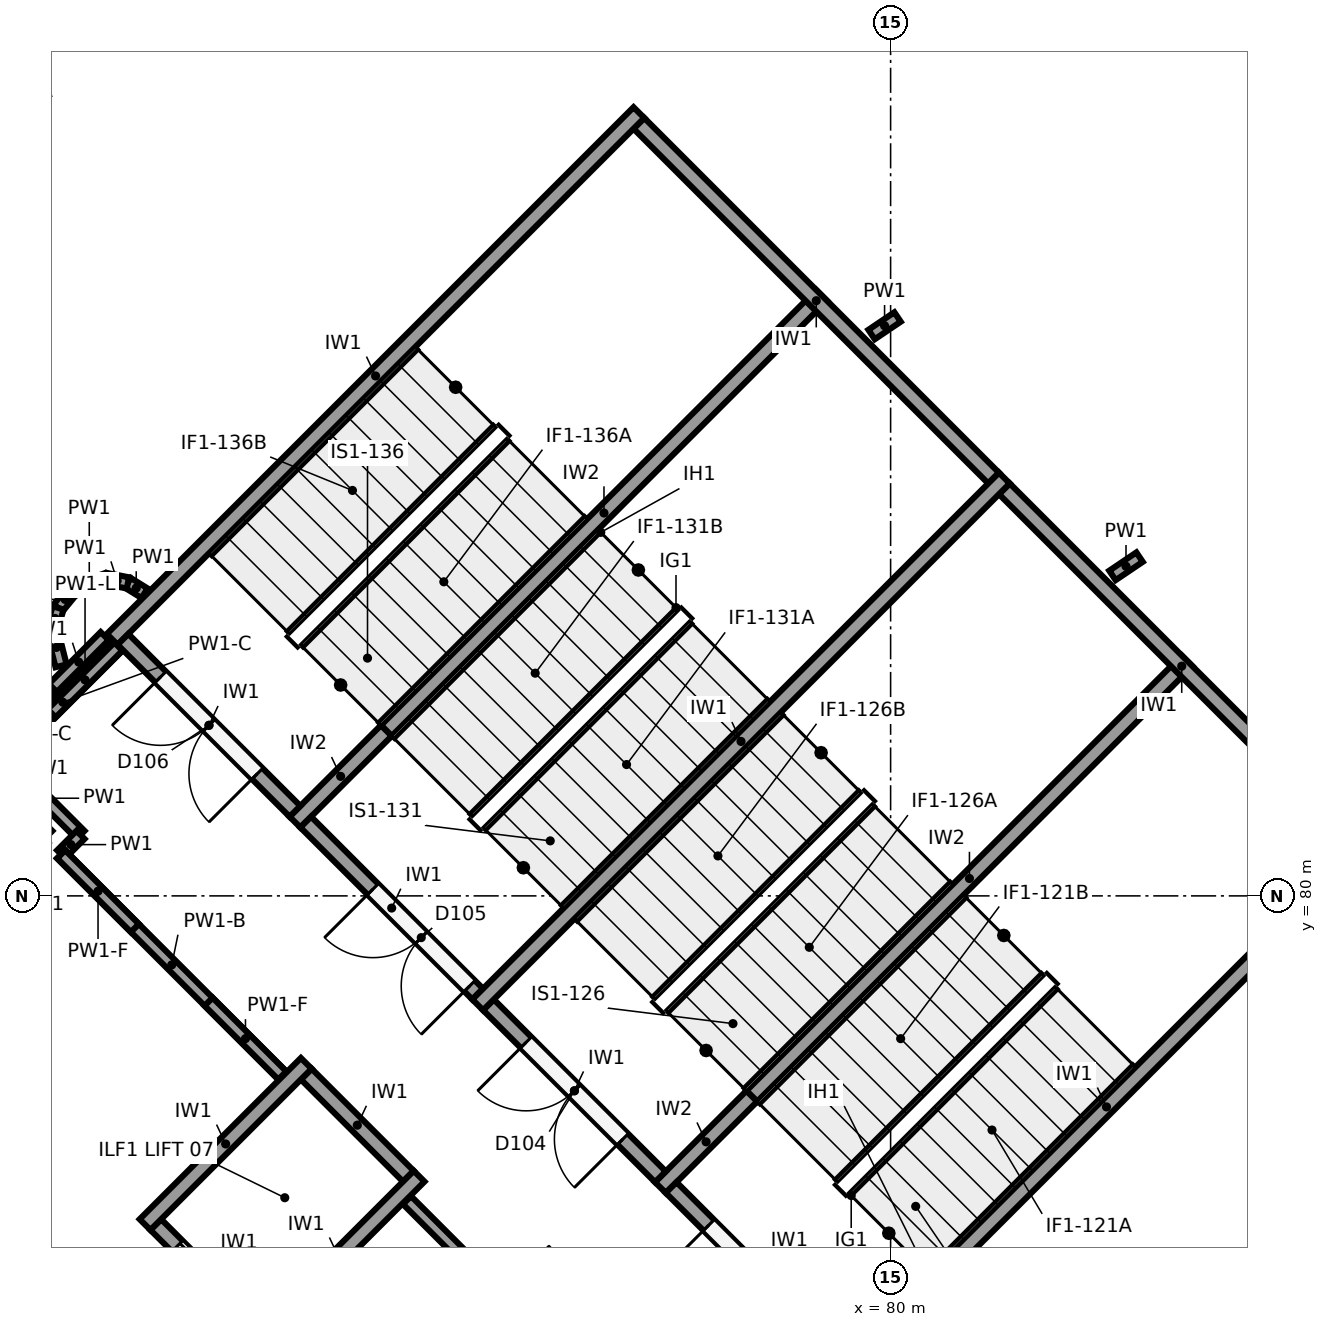
"""IFC4 building model, lengths in metres.
Left out: names, types, materials, properties, quantities, classifications, styles, units other than length and angle.
Written with IfcOpenShell. Run it as: python <this file> out.ifc"""

import sys

from ifc_helpers import new_model, si_unit, direction, frame, frame_2d, origin, origin_2d, place, context, subcontext, project, spatial, rectangle, circle, extrude, element, fill, save


model = new_model("IFC4")
c1 = context("Model", 3, precision=1e-05, world=origin(), true_north=direction((0.0, 1.0)))
c2 = subcontext(c1, "Body", "Model", "MODEL_VIEW")
j1 = project(units=[si_unit("LENGTHUNIT", "METRE"), si_unit("PLANEANGLEUNIT", "RADIAN")], contexts=[c1])
p1 = place(None, origin())
s1 = spatial("IfcSite", under=j1, at=p1, CompositionType="ELEMENT")
p2 = place(p1, origin())
s2 = spatial("IfcBuilding", under=s1, at=p2, CompositionType="ELEMENT")
p3 = place(p2, frame((0.0, 0.0, -4.0)))
s3 = spatial("IfcBuildingStorey", under=s2, at=p3, CompositionType="ELEMENT", Elevation=-4.0)
p4 = place(p3, frame((71.775, 79.889, -1.2), z_axis=(0.0, 0.0, 1.0), x_axis=(1.0, 0.0, 0.0)))
e1 = element("IfcColumn", 1, at=p4, inside=s3, PredefinedType="COLUMN", context=c2, shape_type="SweptSolid", body=[
    extrude(circle(Radius=0.6, at=origin_2d()), origin(), (0.0, 0.0, 1.0), 5.2),
])
p5 = place(p3, frame((85.174, 89.174, -0.4), z_axis=(0.0, 0.0, 1.0), x_axis=(1.0, 0.0, 0.0)))
e2 = element("IfcColumn", 2, at=p5, inside=s3, PredefinedType="COLUMN", context=c2, shape_type="SweptSolid", body=[
    extrude(circle(Radius=0.5, at=origin_2d()), origin(), (0.0, 0.0, 1.0), 4.4),
])
p6 = place(p3, frame((71.857, 91.151, -0.4), z_axis=(0.0, 0.0, 1.0), x_axis=(1.0, 0.0, 0.0)))
e3 = element("IfcColumn", 3, at=p6, inside=s3, PredefinedType="COLUMN", context=c2, shape_type="SweptSolid", body=[
    extrude(circle(Radius=0.45, at=origin_2d()), origin(), (0.0, 0.0, 1.0), 4.4),
])
for number, where, z_axis, x_axis in (
    (4, (86.305, 80.688, -1.2), (0.0, 0.0, 1.0), (-0.707, -0.707, 0.0)),
    (5, (81.497, 85.497, -1.2), (0.0, 0.0, 1.0), (-0.707, -0.707, 0.0)),
    (6, (76.688, 90.305, -1.2), (0.0, 0.0, 1.0), (-0.707, -0.707, 0.0)),
):
    element("IfcWall", number, at=place(p3, frame(where, z_axis=z_axis, x_axis=x_axis)), inside=s3, PredefinedType="SHEAR", context=c2, shape_type="SweptSolid", body=[
        extrude(rectangle(XDim=9.8, YDim=0.2, at=frame_2d((4.9, 0.0))), origin(), (0.0, 0.0, 1.0), 4.8),
    ])
for number, where, z_axis, x_axis in (
    (7, (86.164, 80.688, -1.2), (0.0, 0.0, 1.0), (-0.707, 0.707, 0.0)),
    (8, (81.355, 85.497, -1.2), (0.0, 0.0, 1.0), (-0.707, 0.707, 0.0)),
):
    element("IfcWall", number, at=place(p3, frame(where, z_axis=z_axis, x_axis=x_axis)), inside=s3, PredefinedType="SHEAR", context=c2, shape_type="SweptSolid", body=[
        extrude(rectangle(XDim=6.6, YDim=0.2, at=frame_2d((3.3, 0.0))), origin(), (0.0, 0.0, 1.0), 4.8),
    ])
p7 = place(p3, frame((83.901, 83.093, -1.2), z_axis=(0.0, 0.0, 1.0), x_axis=(-0.707106781187, -0.707106781187, 0.0)))
e9 = element("IfcWall", 9, at=p7, inside=s3, PredefinedType="SHEAR", context=c2, shape_type="SweptSolid", body=[
    extrude(rectangle(XDim=8.1, YDim=0.2, at=frame_2d((4.05, 0.0))), origin(), (0.0, 0.0, 1.0), 4.8),
])
p8 = place(p3, frame((78.173, 77.365, -1.2), z_axis=(0.0, 0.0, 1.0), x_axis=(-0.707178586901, -0.707034968179, 0.0)))
e10 = element("IfcWall", 10, at=p8, inside=s3, PredefinedType="SHEAR", context=c2, shape_type="SweptSolid", body=[
    extrude(rectangle(XDim=1.7, YDim=0.2, at=frame_2d((0.85, 0.0))), origin(), (0.0, 0.0, 1.0), 4.8),
])
p9 = place(p3, frame((79.093, 87.901, -1.2), z_axis=(0.0, 0.0, 1.0), x_axis=(-0.707106781187, -0.707106781187, 0.0)))
e11 = element("IfcWall", 11, at=p9, inside=s3, PredefinedType="SHEAR", context=c2, shape_type="SweptSolid", body=[
    extrude(rectangle(XDim=8.1, YDim=0.2, at=frame_2d((4.05, 0.0))), origin(), (0.0, 0.0, 1.0), 4.8),
])
p10 = place(p3, frame((73.365, 82.173, -1.2), z_axis=(0.0, 0.0, 1.0), x_axis=(-0.707034968179, -0.707178586901, 0.0)))
e12 = element("IfcWall", 12, at=p10, inside=s3, PredefinedType="SHEAR", context=c2, shape_type="SweptSolid", body=[
    extrude(rectangle(XDim=1.7, YDim=0.2, at=frame_2d((0.85, 0.0))), origin(), (0.0, 0.0, 1.0), 4.8),
])
p11 = place(p3, frame((79.375, 73.9, -1.2), z_axis=(0.0, 0.0, 1.0), x_axis=(-0.707068634461, 0.707144925854, 0.0)))
e13 = element("IfcWall", 13, at=p11, inside=s3, PredefinedType="SHEAR", context=c2, shape_type="SweptSolid", body=[
    extrude(rectangle(XDim=3.2, YDim=0.2, at=frame_2d((1.6, 0.0))), origin(), (0.0, 0.0, 1.0), 4.8),
])
p12 = place(p11, frame((0.7, 0.0, 1.2)))
e14 = element("IfcOpeningElement", 14, at=p12, cuts=e13, PredefinedType="OPENING", context=c2, shape_type="SweptSolid", body=[
    extrude(rectangle(XDim=1.8, YDim=2.1, at=frame_2d((0.9, 1.05))), frame((0.0, 0.11, 0.0), z_axis=(0.0, -1.0, 0.0), x_axis=(1.0, 0.0, 0.0)), (0.0, 0.0, 1.0), 0.22),
])
p13 = place(p3, frame((76.971, 76.304, -1.2), z_axis=(0.0, 0.0, 1.0), x_axis=(-0.707106781187, 0.707106781187, 0.0)))
e15 = element("IfcWall", 15, at=p13, inside=s3, PredefinedType="SHEAR", context=c2, shape_type="SweptSolid", body=[
    extrude(rectangle(XDim=3.2, YDim=0.2, at=frame_2d((1.6, 0.0))), origin(), (0.0, 0.0, 1.0), 4.8),
])
p14 = place(p13, frame((0.7, 0.0, 1.2)))
e16 = element("IfcOpeningElement", 16, at=p14, cuts=e15, PredefinedType="OPENING", context=c2, shape_type="SweptSolid", body=[
    extrude(rectangle(XDim=1.8, YDim=2.1, at=frame_2d((0.9, 1.05))), frame((0.0, 0.11, 0.0), z_axis=(0.0, -1.0, 0.0), x_axis=(1.0, 0.0, 0.0)), (0.0, 0.0, 1.0), 0.22),
])
p15 = place(p3, frame((74.567, 78.708, -1.2), z_axis=(0.0, 0.0, 1.0), x_axis=(-0.707106781187, 0.707106781187, 0.0)))
e17 = element("IfcWall", 17, at=p15, inside=s3, PredefinedType="SHEAR", context=c2, shape_type="SweptSolid", body=[
    extrude(rectangle(XDim=3.2, YDim=0.2, at=frame_2d((1.6, 0.0))), origin(), (0.0, 0.0, 1.0), 4.8),
])
p16 = place(p15, frame((0.15, 0.0, 1.2)))
e18 = element("IfcOpeningElement", 18, at=p16, cuts=e17, PredefinedType="OPENING", context=c2, shape_type="SweptSolid", body=[
    extrude(rectangle(XDim=1.8, YDim=2.1, at=frame_2d((0.9, 1.05))), frame((0.0, 0.11, 0.0), z_axis=(0.0, -1.0, 0.0), x_axis=(1.0, 0.0, 0.0)), (0.0, 0.0, 1.0), 0.22),
])
p17 = place(p3, frame((72.163, 81.113, -1.2), z_axis=(0.0, 0.0, 1.0), x_axis=(-0.707144925854, 0.707068634461, 0.0)))
e19 = element("IfcWall", 19, at=p17, inside=s3, PredefinedType="SHEAR", context=c2, shape_type="SweptSolid", body=[
    extrude(rectangle(XDim=3.2, YDim=0.2, at=frame_2d((1.6, 0.0))), origin(), (0.0, 0.0, 1.0), 4.8),
])
p18 = place(p17, frame((0.7, 0.0, 1.2)))
e20 = element("IfcOpeningElement", 20, at=p18, cuts=e19, PredefinedType="OPENING", context=c2, shape_type="SweptSolid", body=[
    extrude(rectangle(XDim=1.8, YDim=2.1, at=frame_2d((0.9, 1.05))), frame((0.0, 0.11, 0.0), z_axis=(0.0, -1.0, 0.0), x_axis=(1.0, 0.0, 0.0)), (0.0, 0.0, 1.0), 0.22),
])
for number, where, z_axis, x_axis in (
    (21, (73.797, 76.312, -1.2), (0.0, 0.0, 1.0), (-0.707, -0.707, 0.0)),
    (22, (72.312, 77.797, -1.2), (0.0, 0.0, 1.0), (-0.707, -0.707, 0.0)),
):
    element("IfcWall", number, at=place(p3, frame(where, z_axis=z_axis, x_axis=x_axis)), inside=s3, PredefinedType="SHEAR", context=c2, shape_type="SweptSolid", body=[
        extrude(rectangle(XDim=3.0, YDim=0.2, at=frame_2d((1.5, 0.0))), origin(), (0.0, 0.0, 1.0), 4.8),
    ])
p19 = place(p3, frame((73.656, 76.312, -1.2), z_axis=(0.0, 0.0, 1.0), x_axis=(-0.707106781187, 0.707106781187, 0.0)))
e23 = element("IfcWall", 23, at=p19, inside=s3, PredefinedType="SHEAR", context=c2, shape_type="SweptSolid", body=[
    extrude(rectangle(XDim=1.9, YDim=0.2, at=frame_2d((0.95, 0.0))), origin(), (0.0, 0.0, 1.0), 4.8),
])
p20 = place(p3, frame((71.676, 74.332, -1.2), z_axis=(0.0, 0.0, 1.0), x_axis=(-0.707106781187, 0.707106781187, 0.0)))
e24 = element("IfcWall", 24, at=p20, inside=s3, PredefinedType="SHEAR", context=c2, shape_type="SweptSolid", body=[
    extrude(rectangle(XDim=1.9, YDim=0.2, at=frame_2d((0.95, 0.0))), origin(), (0.0, 0.0, 1.0), 4.8),
])
p21 = place(p20, frame((0.4, 0.0, 1.2)))
e25 = element("IfcOpeningElement", 25, at=p21, cuts=e24, PredefinedType="OPENING", context=c2, shape_type="SweptSolid", body=[
    extrude(rectangle(XDim=1.1, YDim=2.1, at=frame_2d((0.55, 1.05))), frame((0.0, 0.11, 0.0), z_axis=(0.0, -1.0, 0.0), x_axis=(1.0, 0.0, 0.0)), (0.0, 0.0, 1.0), 0.22),
])
p22 = place(p3, frame((68.998, 95.137, -1.2), z_axis=(0.0, 0.0, 1.0), x_axis=(-0.330263153216, -0.943888896866, 0.0)))
e26 = element("IfcWall", 26, at=p22, inside=s3, PredefinedType="SHEAR", context=c2, shape_type="SweptSolid", body=[
    extrude(rectangle(XDim=8.1, YDim=0.2, at=frame_2d((4.05, 0.0))), origin(), (0.0, 0.0, 1.0), 4.8),
])
p23 = place(p3, frame((82.919, 84.216, 0.0), z_axis=(0.0, 0.0, 1.0), x_axis=(0.828717044538, 0.55966781227, 0.0)))
e27 = element("IfcWall", 27, at=p23, inside=s3, PredefinedType="PARTITIONING", context=c2, shape_type="SweptSolid", body=[
    extrude(rectangle(XDim=0.43, YDim=0.15, at=frame_2d((0.215, 0.0))), origin(), (0.0, 0.0, 1.0), 3.6),
])
p24 = place(p3, frame((69.66, 83.418, 0.0), z_axis=(0.0, 0.0, 1.0), x_axis=(-0.706980568466, -0.707232971383, 0.0)))
e28 = element("IfcWall", 28, at=p24, inside=s3, PredefinedType="PARTITIONING", context=c2, shape_type="SweptSolid", body=[
    extrude(rectangle(XDim=0.967, YDim=0.15, at=frame_2d((0.484, 0.0))), origin(), (0.0, 0.0, 1.0), 3.6),
])
p25 = place(p3, frame((68.976, 82.734, 0.0), z_axis=(0.0, 0.0, 1.0), x_axis=(-0.707359184083, -0.706854288163, 0.0)))
e29 = element("IfcWall", 29, at=p25, inside=s3, PredefinedType="PARTITIONING", context=c2, shape_type="SweptSolid", body=[
    extrude(rectangle(XDim=0.484, YDim=0.15, at=frame_2d((0.242, 0.0))), origin(), (0.0, 0.0, 1.0), 2.7),
])
p26 = place(p3, frame((80.091, 87.616, 0.0), z_axis=(0.0, 0.0, 1.0), x_axis=(-0.828663224866, -0.559747496425, 0.0)))
e30 = element("IfcWall", 30, at=p26, inside=s3, PredefinedType="PARTITIONING", context=c2, shape_type="SweptSolid", body=[
    extrude(rectangle(XDim=0.412, YDim=0.15, at=frame_2d((0.206, 0.0))), origin(), (0.0, 0.0, 1.0), 3.6),
])
p27 = place(p3, frame((68.377, 81.767, 0.0), z_axis=(0.0, 0.0, 1.0), x_axis=(0.707106781187, -0.707106781187, 0.0)))
e31 = element("IfcWall", 31, at=p27, inside=s3, PredefinedType="PARTITIONING", context=c2, shape_type="SweptSolid", body=[
    extrude(rectangle(XDim=1.365, YDim=0.15, at=frame_2d((0.682, 0.0))), origin(), (0.0, 0.0, 1.0), 3.6),
])
p28 = place(p3, frame((69.342, 80.802, 0.0), z_axis=(0.0, 0.0, 1.0), x_axis=(-0.705750875464, -0.708460091877, 0.0)))
e32 = element("IfcWall", 32, at=p28, inside=s3, PredefinedType="PARTITIONING", context=c2, shape_type="SweptSolid", body=[
    extrude(rectangle(XDim=0.36, YDim=0.15, at=frame_2d((0.18, 0.0))), origin(), (0.0, 0.0, 1.0), 3.6),
])
p29 = place(p3, frame((69.087, 80.547, 0.0), z_axis=(0.0, 0.0, 1.0), x_axis=(0.707077113823, -0.707136447306, 0.0)))
e33 = element("IfcWall", 33, at=p29, inside=s3, PredefinedType="PARTITIONING", context=c2, shape_type="SweptSolid", body=[
    extrude(rectangle(XDim=4.115, YDim=0.15, at=frame_2d((2.057, 0.0))), origin(), (0.0, 0.0, 1.0), 2.5),
])
for number, where, z_axis, x_axis in (
    (34, (69.087, 80.547, 2.5), (0.0, 0.0, 1.0), (0.707, -0.707, 0.0)),
    (35, (71.027, 78.607, 2.5), (0.0, 0.0, 1.0), (0.707, -0.707, 0.0)),
):
    element("IfcWall", number, at=place(p3, frame(where, z_axis=z_axis, x_axis=x_axis)), inside=s3, PredefinedType="PARTITIONING", context=c2, shape_type="SweptSolid", body=[
        extrude(rectangle(XDim=1.372, YDim=0.15, at=frame_2d((0.686, 0.0))), origin(), (0.0, 0.0, 1.0), 1.1),
    ])
p30 = place(p3, frame((73.637, 75.997, 0.0), z_axis=(0.0, 0.0, 1.0), x_axis=(0.707128915972, -0.707084645708, 0.0)))
e36 = element("IfcWall", 36, at=p30, inside=s3, PredefinedType="PARTITIONING", context=c2, shape_type="SweptSolid", body=[
    extrude(rectangle(XDim=5.515, YDim=0.15, at=frame_2d((2.757, 0.0))), origin(), (0.0, 0.0, 1.0), 3.6),
])
p31 = place(p30, frame((1.75, 0.0, 0.0)))
e37 = element("IfcOpeningElement", 37, at=p31, cuts=e36, PredefinedType="OPENING", context=c2, shape_type="SweptSolid", body=[
    extrude(rectangle(XDim=1.8, YDim=2.1, at=frame_2d((0.9, 1.05))), frame((0.0, 0.085, 0.0), z_axis=(0.0, -1.0, 0.0), x_axis=(1.0, 0.0, 0.0)), (0.0, 0.0, 1.0), 0.17),
])
p32 = place(p3, frame((69.84, 83.28, 0.0), z_axis=(0.0, 0.0, 1.0), x_axis=(-0.707165768196, -0.707047789256, 0.0)))
e38 = element("IfcWall", 38, at=p32, inside=s3, PredefinedType="PARTITIONING", context=c2, shape_type="SweptSolid", body=[
    extrude(rectangle(XDim=2.069, YDim=0.15, at=frame_2d((1.035, 0.0))), origin(), (0.0, 0.0, 1.0), 2.7),
])
p33 = place(p3, frame((69.84, 83.28, 2.7), z_axis=(0.0, 0.0, 1.0), x_axis=(-0.707205106539, -0.70700844216, 0.0)))
e39 = element("IfcWall", 39, at=p33, inside=s3, PredefinedType="PARTITIONING", context=c2, shape_type="SweptSolid", body=[
    extrude(rectangle(XDim=1.241, YDim=0.15, at=frame_2d((0.621, 0.0))), origin(), (0.0, 0.0, 1.0), 0.9),
])
p34 = place(p3, frame((70.184, 83.982, 0.0), z_axis=(0.0, 0.0, 1.0), x_axis=(-0.850648487644, 0.525734867085, 0.0)))
e40 = element("IfcWall", 40, at=p34, inside=s3, PredefinedType="PARTITIONING", context=c2, shape_type="SweptSolid", body=[
    extrude(rectangle(XDim=0.258, YDim=0.15, at=frame_2d((0.129, 0.0))), origin(), (0.0, 0.0, 1.0), 3.6),
])
p35 = place(p3, frame((69.965, 84.118, 0.0), z_axis=(0.0, 0.0, 1.0), x_axis=(-0.9808082431, 0.194974845214, 0.0)))
e41 = element("IfcWall", 41, at=p35, inside=s3, PredefinedType="PARTITIONING", context=c2, shape_type="SweptSolid", body=[
    extrude(rectangle(XDim=0.288, YDim=0.15, at=frame_2d((0.144, 0.0))), origin(), (0.0, 0.0, 1.0), 3.6),
])
p36 = place(p3, frame((69.682, 84.174, 0.0), z_axis=(0.0, 0.0, 1.0), x_axis=(-0.941476660656, -0.337078177044, 0.0)))
e42 = element("IfcWall", 42, at=p36, inside=s3, PredefinedType="PARTITIONING", context=c2, shape_type="SweptSolid", body=[
    extrude(rectangle(XDim=0.479, YDim=0.15, at=frame_2d((0.24, 0.0))), origin(), (0.0, 0.0, 1.0), 3.6),
])
for number, where, z_axis, x_axis in (
    (43, (69.231, 84.012, 0.0), (0.0, 0.0, 1.0), (-0.635, -0.773, 0.0)),
    (44, (69.047, 83.789, 0.0), (0.0, 0.0, 1.0), (-0.29, -0.957, 0.0)),
):
    element("IfcWall", number, at=place(p3, frame(where, z_axis=z_axis, x_axis=x_axis)), inside=s3, PredefinedType="PARTITIONING", context=c2, shape_type="SweptSolid", body=[
        extrude(rectangle(XDim=0.289, YDim=0.15, at=frame_2d((0.145, 0.0))), origin(), (0.0, 0.0, 1.0), 3.6),
    ])
p37 = place(p3, frame((68.963, 83.512, 0.0), z_axis=(0.0, 0.0, 1.0), x_axis=(0.244371491545, -0.969681687009, 0.0)))
e45 = element("IfcWall", 45, at=p37, inside=s3, PredefinedType="PARTITIONING", context=c2, shape_type="SweptSolid", body=[
    extrude(rectangle(XDim=0.5, YDim=0.15, at=frame_2d((0.25, 0.0))), origin(), (0.0, 0.0, 1.0), 3.6),
])
p38 = place(p12, origin())
e46 = element("IfcDoor", 46, at=p38, inside=s3, OperationType="DOUBLE_DOOR_SINGLE_SWING", PredefinedType="DOOR", context=c2, shape_type="SweptSolid", body=[
    extrude(rectangle(XDim=1.8, YDim=2.1, at=frame_2d((0.9, 1.05))), frame((0.0, 0.025, 0.0), z_axis=(0.0, -1.0, 0.0), x_axis=(1.0, 0.0, 0.0)), (0.0, 0.0, 1.0), 0.05),
])
fill(e14, e46)
p39 = place(p14, origin())
e47 = element("IfcDoor", 47, at=p39, inside=s3, OperationType="DOUBLE_DOOR_SINGLE_SWING", PredefinedType="DOOR", context=c2, shape_type="SweptSolid", body=[
    extrude(rectangle(XDim=1.8, YDim=2.1, at=frame_2d((0.9, 1.05))), frame((0.0, 0.025, 0.0), z_axis=(0.0, -1.0, 0.0), x_axis=(1.0, 0.0, 0.0)), (0.0, 0.0, 1.0), 0.05),
])
fill(e16, e47)
p40 = place(p16, origin())
e48 = element("IfcDoor", 48, at=p40, inside=s3, OperationType="DOUBLE_DOOR_SINGLE_SWING", PredefinedType="DOOR", context=c2, shape_type="SweptSolid", body=[
    extrude(rectangle(XDim=1.8, YDim=2.1, at=frame_2d((0.9, 1.05))), frame((0.0, 0.025, 0.0), z_axis=(0.0, -1.0, 0.0), x_axis=(1.0, 0.0, 0.0)), (0.0, 0.0, 1.0), 0.05),
])
fill(e18, e48)
p41 = place(p18, origin())
e49 = element("IfcDoor", 49, at=p41, inside=s3, OperationType="DOUBLE_DOOR_SINGLE_SWING", PredefinedType="DOOR", context=c2, shape_type="SweptSolid", body=[
    extrude(rectangle(XDim=1.8, YDim=2.1, at=frame_2d((0.9, 1.05))), frame((0.0, 0.025, 0.0), z_axis=(0.0, -1.0, 0.0), x_axis=(1.0, 0.0, 0.0)), (0.0, 0.0, 1.0), 0.05),
])
fill(e20, e49)
p42 = place(p21, origin())
e50 = element("IfcDoor", 50, at=p42, inside=s3, OperationType="SLIDING_TO_LEFT", PredefinedType="DOOR", context=c2, shape_type="SweptSolid", body=[
    extrude(rectangle(XDim=1.1, YDim=2.1, at=frame_2d((0.55, 1.05))), frame((0.0, 0.025, 0.0), z_axis=(0.0, -1.0, 0.0), x_axis=(1.0, 0.0, 0.0)), (0.0, 0.0, 1.0), 0.05),
])
fill(e25, e50)
save(model, sys.argv[1])
